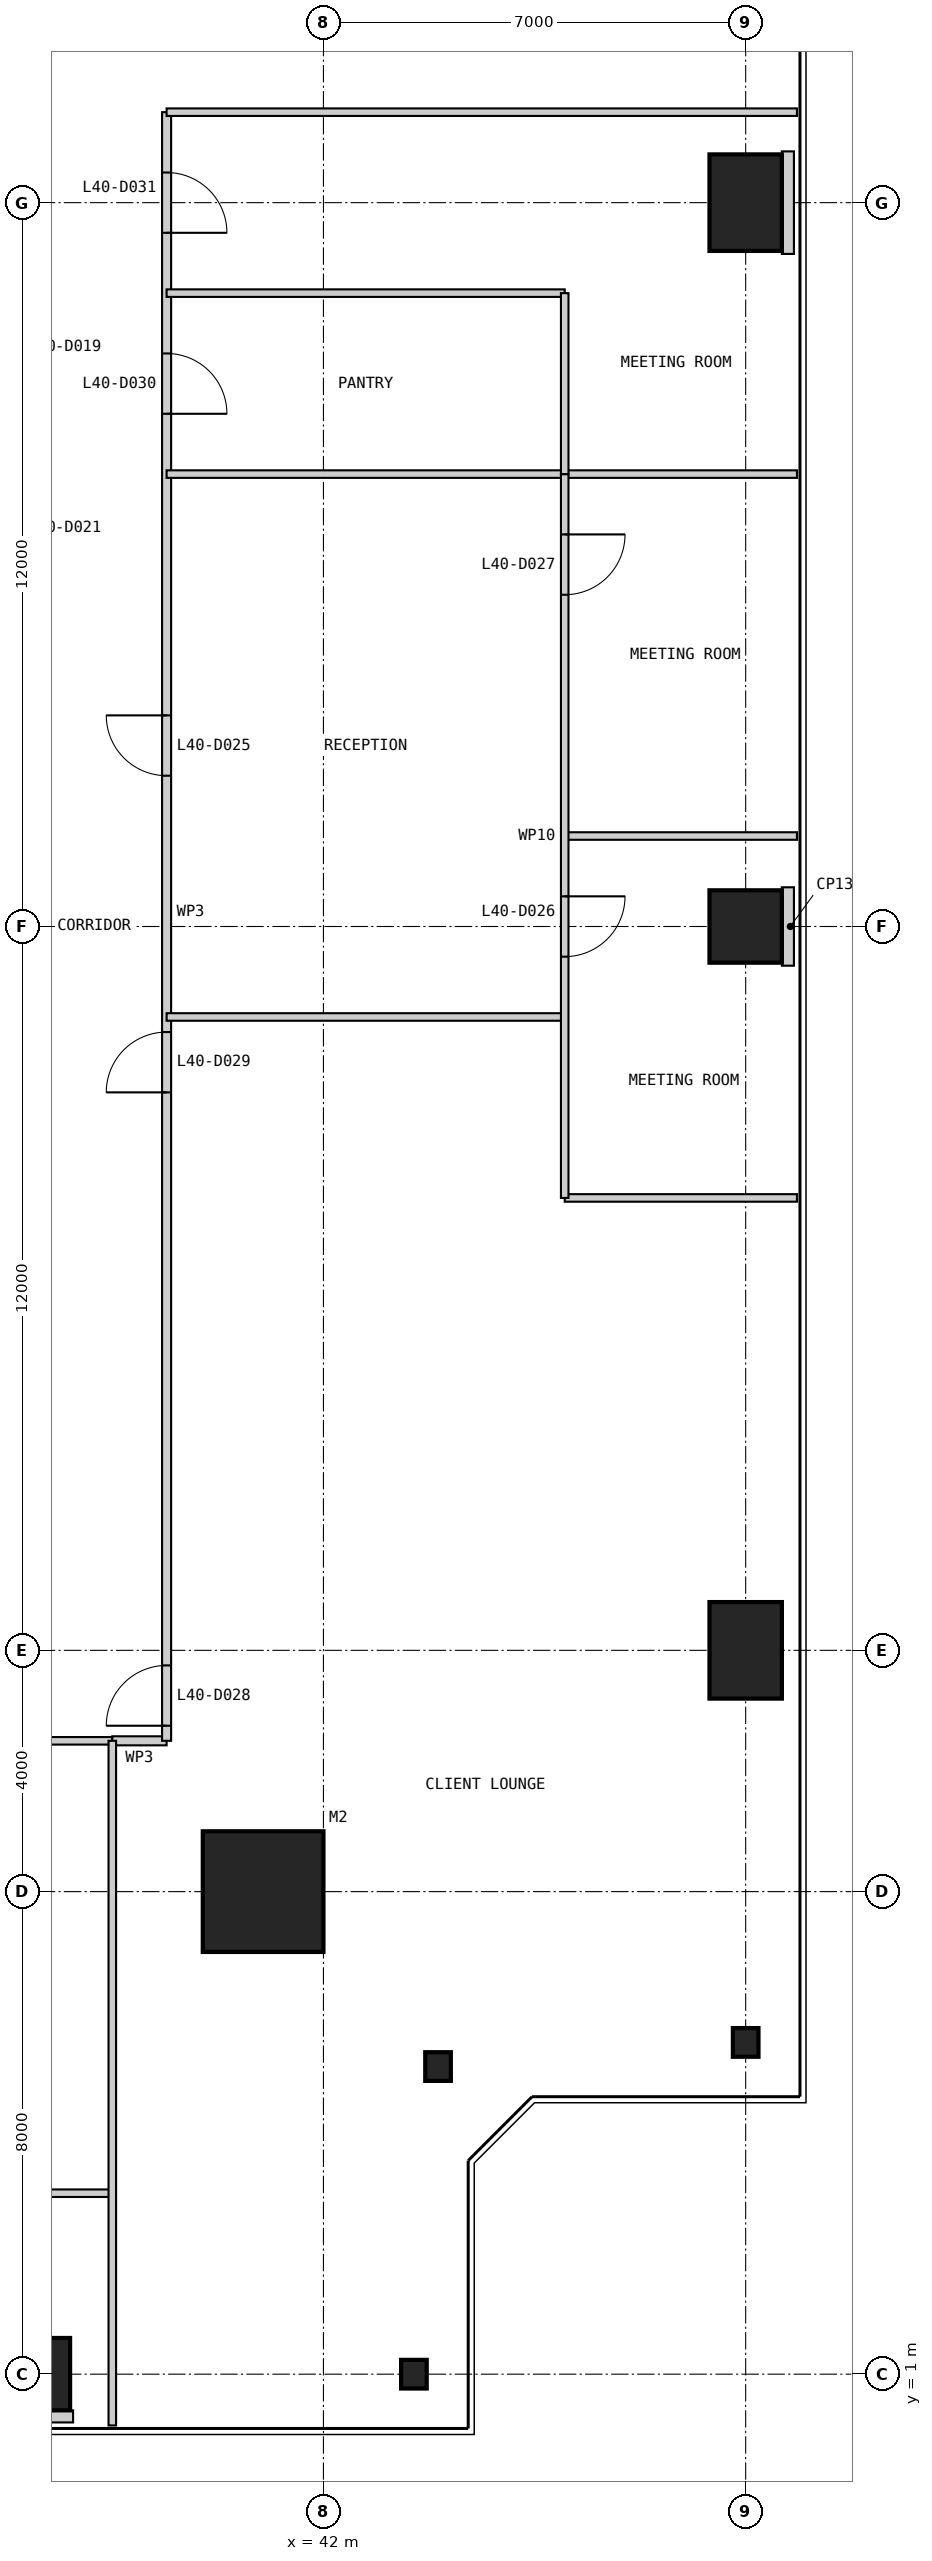
"""IFC4 building model, lengths in metres.
Left out: names, types, materials, properties, quantities, classifications, styles, units other than length and angle.
Written with IfcOpenShell. Run it as: python <this file> out.ifc"""

import sys

from ifc_helpers import new_model, si_unit, direction, frame, frame_2d, origin, origin_2d, place, context, subcontext, project, spatial, rectangle, i_section, extrude, element, fill, save


model = new_model("IFC4")
c1 = context("Model", 3, precision=1e-05, world=origin(), true_north=direction((0.0, 1.0)))
c2 = subcontext(c1, "Body", "Model", "MODEL_VIEW")
j1 = project(units=[si_unit("LENGTHUNIT", "METRE"), si_unit("PLANEANGLEUNIT", "RADIAN")], contexts=[c1])
p1 = place(None, origin())
s1 = spatial("IfcSite", under=j1, at=p1, CompositionType="ELEMENT")
p2 = place(p1, origin())
s2 = spatial("IfcBuilding", under=s1, at=p2, CompositionType="ELEMENT")
p3 = place(p2, frame((0.0, 0.0, 173.8)))
s3 = spatial("IfcBuildingStorey", under=s2, at=p3, CompositionType="ELEMENT", Elevation=173.8)
p4 = place(p3, frame((41.0, 9.0, 0.0), z_axis=(0.0, 0.0, 1.0), x_axis=(1.0, 0.0, 0.0)))
e1 = element("IfcColumn", 1, at=p4, inside=s3, PredefinedType="COLUMN", context=c2, shape_type="SweptSolid", body=[
    extrude(rectangle(XDim=2.0, YDim=2.0, at=origin_2d()), origin(), (0.0, 0.0, 1.0), 4.0),
])
p5 = place(p3, frame((37.0, 1.0, 0.0), z_axis=(0.0, 0.0, 1.0), x_axis=(1.0, 0.0, 0.0)))
e2 = element("IfcColumn", 2, at=p5, inside=s3, PredefinedType="COLUMN", context=c2, shape_type="SweptSolid", body=[
    extrude(rectangle(XDim=1.6, YDim=1.2, at=origin_2d()), origin(), (0.0, 0.0, 1.0), 4.0),
])
for number, where, z_axis, x_axis in (
    (3, (43.5, 1.0, 0.0), (0.0, 0.0, 1.0), (1.0, 0.0, 0.0)),
    (4, (43.9, 6.1, 0.0), (0.0, 0.0, 1.0), (1.0, 0.0, 0.0)),
    (5, (49.0, 6.5, 0.0), (0.0, 0.0, 1.0), (1.0, 0.0, 0.0)),
):
    element("IfcColumn", number, at=place(p3, frame(where, z_axis=z_axis, x_axis=x_axis)), inside=s3, PredefinedType="COLUMN", context=c2, shape_type="SweptSolid", body=[
        extrude(i_section(OverallWidth=0.424, OverallDepth=0.475, WebThickness=0.048, FlangeThickness=0.077, at=origin_2d()), origin(), (0.0, 0.0, 1.0), 4.0),
    ])
p6 = place(p3, frame((49.0, 13.0, 0.0), z_axis=(0.0, 0.0, 1.0), x_axis=(1.0, 0.0, 0.0)))
e6 = element("IfcColumn", 6, at=p6, inside=s3, PredefinedType="COLUMN", context=c2, shape_type="SweptSolid", body=[
    extrude(rectangle(XDim=1.2, YDim=1.6, at=origin_2d()), origin(), (0.0, 0.0, 1.0), 4.0),
])
p7 = place(p3, frame((49.0, 25.0, 0.0), z_axis=(0.0, 0.0, 1.0), x_axis=(1.0, 0.0, 0.0)))
e7 = element("IfcColumn", 7, at=p7, inside=s3, PredefinedType="COLUMN", context=c2, shape_type="SweptSolid", body=[
    extrude(rectangle(XDim=1.2, YDim=1.2, at=origin_2d()), origin(), (0.0, 0.0, 1.0), 4.0),
])
p8 = place(p3, frame((49.0, 37.0, 0.0), z_axis=(0.0, 0.0, 1.0), x_axis=(1.0, 0.0, 0.0)))
e8 = element("IfcColumn", 8, at=p8, inside=s3, PredefinedType="COLUMN", context=c2, shape_type="SweptSolid", body=[
    extrude(rectangle(XDim=1.2, YDim=1.6, at=origin_2d()), origin(), (0.0, 0.0, 1.0), 4.0),
])
p9 = place(p3, frame((32.5, 4.0, 0.0), z_axis=(0.0, 0.0, 1.0), x_axis=(1.0, 0.0, 0.0)))
e9 = element("IfcWall", 9, at=p9, inside=s3, PredefinedType="PARTITIONING", context=c2, shape_type="SweptSolid", body=[
    extrude(rectangle(XDim=6.0, YDim=0.125, at=frame_2d((3.0, 0.0))), origin(), (0.0, 0.0, 1.0), 3.85),
])
p10 = place(p3, frame((35.5, 11.5, 0.0), z_axis=(0.0, 0.0, 1.0), x_axis=(1.0, 0.0, 0.0)))
e10 = element("IfcWall", 10, at=p10, inside=s3, PredefinedType="PARTITIONING", context=c2, shape_type="SweptSolid", body=[
    extrude(rectangle(XDim=3.0, YDim=0.125, at=frame_2d((1.5, 0.0))), origin(), (0.0, 0.0, 1.0), 3.85),
])
p11 = place(p3, frame((38.5, 11.5, 0.0), z_axis=(0.0, 0.0, 1.0), x_axis=(1.0, 0.0, 0.0)))
e11 = element("IfcWall", 11, at=p11, inside=s3, PredefinedType="PARTITIONING", context=c2, shape_type="SweptSolid", body=[
    extrude(rectangle(XDim=0.9, YDim=0.15, at=frame_2d((0.45, 0.0))), origin(), (0.0, 0.0, 1.0), 3.85),
])
p12 = place(p3, frame((39.4, 11.5, 0.0), z_axis=(0.0, 0.0, 1.0), x_axis=(0.0, 1.0, 0.0)))
e12 = element("IfcWall", 12, at=p12, inside=s3, PredefinedType="PARTITIONING", context=c2, shape_type="SweptSolid", body=[
    extrude(rectangle(XDim=27.0, YDim=0.15, at=frame_2d((13.5, 0.0))), origin(), (0.0, 0.0, 1.0), 3.85),
])
p13 = place(p12, frame((16.0, 0.0, 0.0)))
e13 = element("IfcOpeningElement", 13, at=p13, cuts=e12, PredefinedType="OPENING", context=c2, shape_type="SweptSolid", body=[
    extrude(rectangle(XDim=1.0, YDim=2.2, at=frame_2d((0.5, 1.1))), frame((0.0, 0.085, 0.0), z_axis=(0.0, -1.0, 0.0), x_axis=(1.0, 0.0, 0.0)), (0.0, 0.0, 1.0), 0.17),
])
p14 = place(p12, frame((0.25, 0.0, 0.0)))
e14 = element("IfcOpeningElement", 14, at=p14, cuts=e12, PredefinedType="OPENING", context=c2, shape_type="SweptSolid", body=[
    extrude(rectangle(XDim=1.0, YDim=2.2, at=frame_2d((0.5, 1.1))), frame((0.0, 0.085, 0.0), z_axis=(0.0, -1.0, 0.0), x_axis=(1.0, 0.0, 0.0)), (0.0, 0.0, 1.0), 0.17),
])
p15 = place(p12, frame((10.75, 0.0, 0.0)))
e15 = element("IfcOpeningElement", 15, at=p15, cuts=e12, PredefinedType="OPENING", context=c2, shape_type="SweptSolid", body=[
    extrude(rectangle(XDim=1.0, YDim=2.2, at=frame_2d((0.5, 1.1))), frame((0.0, 0.085, 0.0), z_axis=(0.0, -1.0, 0.0), x_axis=(1.0, 0.0, 0.0)), (0.0, 0.0, 1.0), 0.17),
])
p16 = place(p12, frame((22.0, 0.0, 0.0)))
e16 = element("IfcOpeningElement", 16, at=p16, cuts=e12, PredefinedType="OPENING", context=c2, shape_type="SweptSolid", body=[
    extrude(rectangle(XDim=1.0, YDim=2.2, at=frame_2d((0.5, 1.1))), frame((0.0, 0.085, 0.0), z_axis=(0.0, -1.0, 0.0), x_axis=(1.0, 0.0, 0.0)), (0.0, 0.0, 1.0), 0.17),
])
p17 = place(p12, frame((25.0, 0.0, 0.0)))
e17 = element("IfcOpeningElement", 17, at=p17, cuts=e12, PredefinedType="OPENING", context=c2, shape_type="SweptSolid", body=[
    extrude(rectangle(XDim=1.0, YDim=2.2, at=frame_2d((0.5, 1.1))), frame((0.0, 0.085, 0.0), z_axis=(0.0, -1.0, 0.0), x_axis=(1.0, 0.0, 0.0)), (0.0, 0.0, 1.0), 0.17),
])
p18 = place(p3, frame((38.5, 0.15, 0.0), z_axis=(0.0, 0.0, 1.0), x_axis=(0.0, 1.0, 0.0)))
e18 = element("IfcWall", 18, at=p18, inside=s3, PredefinedType="PARTITIONING", context=c2, shape_type="SweptSolid", body=[
    extrude(rectangle(XDim=11.35, YDim=0.125, at=frame_2d((5.675, 0.0))), origin(), (0.0, 0.0, 1.0), 3.85),
])
p19 = place(p3, frame((49.85, 20.5, 0.0), z_axis=(0.0, 0.0, 1.0), x_axis=(-1.0, 0.0, 0.0)))
e19 = element("IfcWall", 19, at=p19, inside=s3, PredefinedType="PARTITIONING", context=c2, shape_type="SweptSolid", body=[
    extrude(rectangle(XDim=3.85, YDim=0.125, at=frame_2d((1.925, 0.0))), origin(), (0.0, 0.0, 1.0), 3.85),
])
p20 = place(p3, frame((46.0, 23.5, 0.0), z_axis=(0.0, 0.0, 1.0), x_axis=(-1.0, 0.0, 0.0)))
e20 = element("IfcWall", 20, at=p20, inside=s3, PredefinedType="PARTITIONING", context=c2, shape_type="SweptSolid", body=[
    extrude(rectangle(XDim=6.6, YDim=0.125, at=frame_2d((3.3, 0.0))), origin(), (0.0, 0.0, 1.0), 3.85),
])
p21 = place(p3, frame((49.85, 26.5, 0.0), z_axis=(0.0, 0.0, 1.0), x_axis=(-1.0, 0.0, 0.0)))
e21 = element("IfcWall", 21, at=p21, inside=s3, PredefinedType="PARTITIONING", context=c2, shape_type="SweptSolid", body=[
    extrude(rectangle(XDim=3.85, YDim=0.125, at=frame_2d((1.925, 0.0))), origin(), (0.0, 0.0, 1.0), 3.85),
])
p22 = place(p3, frame((49.85, 32.5, 0.0), z_axis=(0.0, 0.0, 1.0), x_axis=(-1.0, 0.0, 0.0)))
e22 = element("IfcWall", 22, at=p22, inside=s3, PredefinedType="PARTITIONING", context=c2, shape_type="SweptSolid", body=[
    extrude(rectangle(XDim=10.45, YDim=0.125, at=frame_2d((5.225, 0.0))), origin(), (0.0, 0.0, 1.0), 3.85),
])
p23 = place(p3, frame((46.0, 35.5, 0.0), z_axis=(0.0, 0.0, 1.0), x_axis=(-1.0, 0.0, 0.0)))
e23 = element("IfcWall", 23, at=p23, inside=s3, PredefinedType="PARTITIONING", context=c2, shape_type="SweptSolid", body=[
    extrude(rectangle(XDim=6.6, YDim=0.125, at=frame_2d((3.3, 0.0))), origin(), (0.0, 0.0, 1.0), 3.85),
])
p24 = place(p3, frame((46.0, 20.5, 0.0), z_axis=(0.0, 0.0, 1.0), x_axis=(0.0, 1.0, 0.0)))
e24 = element("IfcWall", 24, at=p24, inside=s3, PredefinedType="PARTITIONING", context=c2, shape_type="SweptSolid", body=[
    extrude(rectangle(XDim=12.0, YDim=0.125, at=frame_2d((6.0, 0.0))), origin(), (0.0, 0.0, 1.0), 3.238),
])
p25 = place(p24, frame((4.0, 0.0, 0.0)))
e25 = element("IfcOpeningElement", 25, at=p25, cuts=e24, PredefinedType="OPENING", context=c2, shape_type="SweptSolid", body=[
    extrude(rectangle(XDim=1.0, YDim=2.2, at=frame_2d((0.5, 1.1))), frame((0.0, 0.073, 0.0), z_axis=(0.0, -1.0, 0.0), x_axis=(1.0, 0.0, 0.0)), (0.0, 0.0, 1.0), 0.145),
])
p26 = place(p24, frame((10.0, 0.0, 0.0)))
e26 = element("IfcOpeningElement", 26, at=p26, cuts=e24, PredefinedType="OPENING", context=c2, shape_type="SweptSolid", body=[
    extrude(rectangle(XDim=1.0, YDim=2.2, at=frame_2d((0.5, 1.1))), frame((0.0, 0.073, 0.0), z_axis=(0.0, -1.0, 0.0), x_axis=(1.0, 0.0, 0.0)), (0.0, 0.0, 1.0), 0.145),
])
p27 = place(p3, frame((46.0, 32.5, 0.0), z_axis=(0.0, 0.0, 1.0), x_axis=(0.0, 1.0, 0.0)))
e27 = element("IfcWall", 27, at=p27, inside=s3, PredefinedType="PARTITIONING", context=c2, shape_type="SweptSolid", body=[
    extrude(rectangle(XDim=3.0, YDim=0.125, at=frame_2d((1.5, 0.0))), origin(), (0.0, 0.0, 1.0), 3.238),
])
p28 = place(p3, frame((49.85, 38.5, 0.0), z_axis=(0.0, 0.0, 1.0), x_axis=(-1.0, 0.0, 0.0)))
e28 = element("IfcWall", 28, at=p28, inside=s3, PredefinedType="PARTITIONING", context=c2, shape_type="SweptSolid", body=[
    extrude(rectangle(XDim=10.45, YDim=0.125, at=frame_2d((5.225, 0.0))), origin(), (0.0, 0.0, 1.0), 3.85),
])
p29 = place(p3, frame((37.0, 0.2, 0.0), z_axis=(0.0, 0.0, 1.0), x_axis=(0.0, 1.0, 0.0)))
e29 = element("IfcWall", 29, at=p29, inside=s3, PredefinedType="PARTITIONING", context=c2, shape_type="SweptSolid", body=[
    extrude(rectangle(XDim=0.2, YDim=1.7, at=frame_2d((0.1, 0.0))), origin(), (0.0, 0.0, 1.0), 3.85),
])
p30 = place(p3, frame((49.8, 25.0, 0.0), z_axis=(0.0, 0.0, 1.0), x_axis=(-1.0, 0.0, 0.0)))
e30 = element("IfcWall", 30, at=p30, inside=s3, PredefinedType="PARTITIONING", context=c2, shape_type="SweptSolid", body=[
    extrude(rectangle(XDim=0.2, YDim=1.3, at=frame_2d((0.1, 0.0))), origin(), (0.0, 0.0, 1.0), 3.85),
])
p31 = place(p3, frame((49.8, 37.0, 0.0), z_axis=(0.0, 0.0, 1.0), x_axis=(-1.0, 0.0, 0.0)))
e31 = element("IfcWall", 31, at=p31, inside=s3, PredefinedType="PARTITIONING", context=c2, shape_type="SweptSolid", body=[
    extrude(rectangle(XDim=0.2, YDim=1.7, at=frame_2d((0.1, 0.0))), origin(), (0.0, 0.0, 1.0), 3.85),
])
p32 = place(p13, origin())
e32 = element("IfcDoor", 32, at=p32, inside=s3, OperationType="SINGLE_SWING_RIGHT", PredefinedType="DOOR", context=c2, shape_type="SweptSolid", body=[
    extrude(rectangle(XDim=1.0, YDim=2.2, at=frame_2d((0.5, 1.1))), frame((0.0, 0.025, 0.0), z_axis=(0.0, -1.0, 0.0), x_axis=(1.0, 0.0, 0.0)), (0.0, 0.0, 1.0), 0.05),
])
fill(e13, e32)
p33 = place(p25, frame((1.0, 0.0, 0.0), z_axis=(0.0, 0.0, 1.0), x_axis=(-1.0, 0.0, 0.0)))
e33 = element("IfcDoor", 33, at=p33, inside=s3, OperationType="SINGLE_SWING_LEFT", PredefinedType="DOOR", context=c2, shape_type="SweptSolid", body=[
    extrude(rectangle(XDim=1.0, YDim=2.2, at=frame_2d((0.5, 1.1))), frame((0.0, 0.025, 0.0), z_axis=(0.0, -1.0, 0.0), x_axis=(1.0, 0.0, 0.0)), (0.0, 0.0, 1.0), 0.05),
])
fill(e25, e33)
p34 = place(p26, frame((1.0, 0.0, 0.0), z_axis=(0.0, 0.0, 1.0), x_axis=(-1.0, 0.0, 0.0)))
e34 = element("IfcDoor", 34, at=p34, inside=s3, OperationType="SINGLE_SWING_LEFT", PredefinedType="DOOR", context=c2, shape_type="SweptSolid", body=[
    extrude(rectangle(XDim=1.0, YDim=2.2, at=frame_2d((0.5, 1.1))), frame((0.0, 0.025, 0.0), z_axis=(0.0, -1.0, 0.0), x_axis=(1.0, 0.0, 0.0)), (0.0, 0.0, 1.0), 0.05),
])
fill(e26, e34)
p35 = place(p14, origin())
e35 = element("IfcDoor", 35, at=p35, inside=s3, OperationType="SINGLE_SWING_LEFT", PredefinedType="DOOR", context=c2, shape_type="SweptSolid", body=[
    extrude(rectangle(XDim=1.0, YDim=2.2, at=frame_2d((0.5, 1.1))), frame((0.0, 0.025, 0.0), z_axis=(0.0, -1.0, 0.0), x_axis=(1.0, 0.0, 0.0)), (0.0, 0.0, 1.0), 0.05),
])
fill(e14, e35)
p36 = place(p15, origin())
e36 = element("IfcDoor", 36, at=p36, inside=s3, OperationType="SINGLE_SWING_LEFT", PredefinedType="DOOR", context=c2, shape_type="SweptSolid", body=[
    extrude(rectangle(XDim=1.0, YDim=2.2, at=frame_2d((0.5, 1.1))), frame((0.0, 0.025, 0.0), z_axis=(0.0, -1.0, 0.0), x_axis=(1.0, 0.0, 0.0)), (0.0, 0.0, 1.0), 0.05),
])
fill(e15, e36)
p37 = place(p16, frame((1.0, 0.0, 0.0), z_axis=(0.0, 0.0, 1.0), x_axis=(-1.0, 0.0, 0.0)))
e37 = element("IfcDoor", 37, at=p37, inside=s3, OperationType="SINGLE_SWING_RIGHT", PredefinedType="DOOR", context=c2, shape_type="SweptSolid", body=[
    extrude(rectangle(XDim=1.0, YDim=2.2, at=frame_2d((0.5, 1.1))), frame((0.0, 0.025, 0.0), z_axis=(0.0, -1.0, 0.0), x_axis=(1.0, 0.0, 0.0)), (0.0, 0.0, 1.0), 0.05),
])
fill(e16, e37)
p38 = place(p17, frame((1.0, 0.0, 0.0), z_axis=(0.0, 0.0, 1.0), x_axis=(-1.0, 0.0, 0.0)))
e38 = element("IfcDoor", 38, at=p38, inside=s3, OperationType="SINGLE_SWING_RIGHT", PredefinedType="DOOR", context=c2, shape_type="SweptSolid", body=[
    extrude(rectangle(XDim=1.0, YDim=2.2, at=frame_2d((0.5, 1.1))), frame((0.0, 0.025, 0.0), z_axis=(0.0, -1.0, 0.0), x_axis=(1.0, 0.0, 0.0)), (0.0, 0.0, 1.0), 0.05),
])
fill(e17, e38)
save(model, sys.argv[1])
